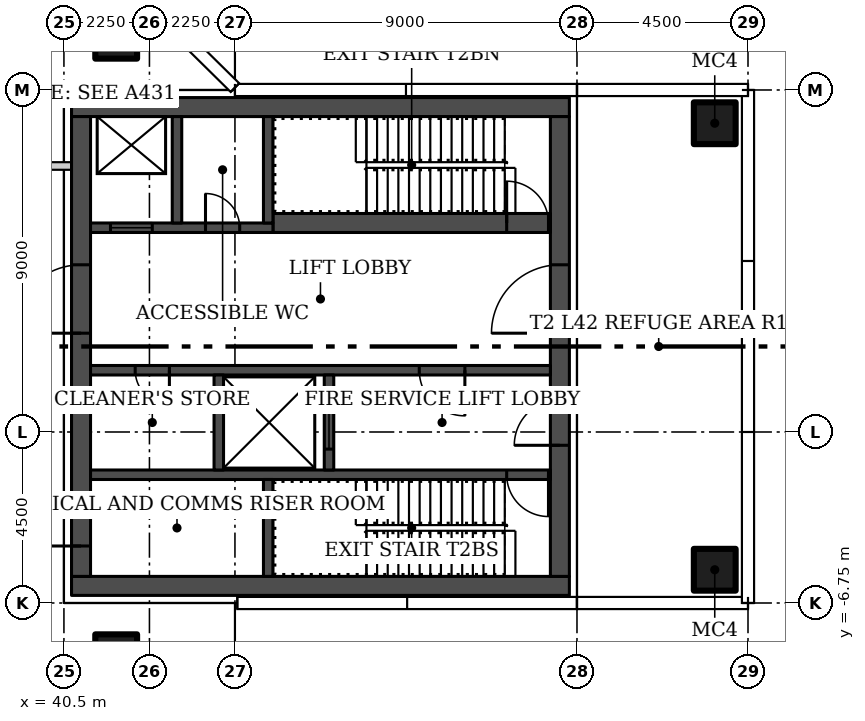
"""IFC4 building model, lengths in metres.
Left out: names, types, materials, properties, quantities, classifications, styles, units other than length and angle.
Written with IfcOpenShell. Run it as: python <this file> out.ifc"""

import sys

from ifc_helpers import new_model, si_unit, direction, frame, frame_2d, origin, origin_2d, place, context, subcontext, project, spatial, rectangle, hollow_rectangle, extrude, element, fill, save


model = new_model("IFC4")
c1 = context("Model", 3, precision=1e-05, world=origin(), true_north=direction((0.0, 1.0)))
c2 = subcontext(c1, "Body", "Model", "MODEL_VIEW")
j1 = project(units=[si_unit("LENGTHUNIT", "METRE"), si_unit("PLANEANGLEUNIT", "RADIAN")], contexts=[c1])
p1 = place(None, origin())
s1 = spatial("IfcSite", under=j1, at=p1, CompositionType="ELEMENT")
p2 = place(p1, origin())
s2 = spatial("IfcBuilding", under=s1, at=p2, CompositionType="ELEMENT")
p3 = place(p2, frame((0.0, 0.0, 177.9)))
s3 = spatial("IfcBuildingStorey", under=s2, at=p3, CompositionType="ELEMENT", Elevation=177.9)
for number, where in (
    (1, (41.875, 8.125, 0.0)),
    (2, (41.875, -8.125, 0.0)),
    (3, (57.625, -5.875, 0.0)),
    (4, (57.625, 5.875, 0.0)),
):
    element("IfcColumn", number, at=place(p3, frame(where)), inside=s3, PredefinedType="COLUMN", context=c2, shape_type="SweptSolid", body=[
        extrude(hollow_rectangle(XDim=1.1, YDim=1.1, WallThickness=0.04, at=origin_2d()), origin(), (0.0, 0.0, 1.0), 4.45),
    ])
p4 = place(p3, frame((26.8, 4.75, 0.0)))
e5 = element("IfcWall", 5, at=p4, inside=s3, PredefinedType="PARTITIONING", context=c2, shape_type="SweptSolid", body=[
    extrude(rectangle(XDim=13.9, YDim=0.2, at=frame_2d((6.95, 0.0))), origin(), (0.0, 0.0, 1.0), 4.45),
])
p5 = place(p4, frame((10.25, 0.0, 0.0)))
e6 = element("IfcOpeningElement", 6, at=p5, cuts=e5, PredefinedType="OPENING", context=c2, shape_type="SweptSolid", body=[
    extrude(rectangle(XDim=1.5, YDim=2.4, at=frame_2d((0.75, 1.2))), frame((0.0, 0.11, 0.0), z_axis=(0.0, -1.0, 0.0), x_axis=(1.0, 0.0, 0.0)), (0.0, 0.0, 1.0), 0.22),
])
p6 = place(p4, frame((2.15, 0.0, 0.0)))
e7 = element("IfcOpeningElement", 7, at=p6, cuts=e5, PredefinedType="OPENING", context=c2, shape_type="SweptSolid", body=[
    extrude(rectangle(XDim=1.5, YDim=2.4, at=frame_2d((0.75, 1.2))), frame((0.0, 0.11, 0.0), z_axis=(0.0, -1.0, 0.0), x_axis=(1.0, 0.0, 0.0)), (0.0, 0.0, 1.0), 0.22),
])
p7 = place(p3, frame((34.55, 6.75, 0.0)))
e8 = element("IfcWall", 8, at=p7, inside=s3, PredefinedType="PARTITIONING", context=c2, shape_type="SweptSolid", body=[
    extrude(rectangle(XDim=6.15, YDim=0.2, at=frame_2d((3.075, 0.0))), origin(), (0.0, 0.0, 1.0), 4.45),
])
p8 = place(p7, frame((2.275, 0.0, 0.0)))
e9 = element("IfcOpeningElement", 9, at=p8, cuts=e8, PredefinedType="OPENING", context=c2, shape_type="SweptSolid", body=[
    extrude(rectangle(XDim=1.5, YDim=2.4, at=frame_2d((0.75, 1.2))), frame((0.0, 0.11, 0.0), z_axis=(0.0, -1.0, 0.0), x_axis=(1.0, 0.0, 0.0)), (0.0, 0.0, 1.0), 0.22),
])
for number, where, z_axis, x_axis in (
    (10, (53.8, -6.3, 0.0), (0.0, 0.0, 1.0), (-1.0, 0.0, 0.0)),
    (11, (53.8, 6.3, 0.0), (0.0, 0.0, 1.0), (-1.0, 0.0, 0.0)),
):
    element("IfcWall", number, at=place(p3, frame(where, z_axis=z_axis, x_axis=x_axis)), inside=s3, PredefinedType="SHEAR", context=c2, shape_type="SweptSolid", body=[
        extrude(rectangle(XDim=13.1, YDim=0.5, at=frame_2d((6.55, 0.0))), origin(), (0.0, 0.0, 1.0), 4.45),
    ])
p9 = place(p3, frame((53.55, -6.05, 0.0), z_axis=(0.0, 0.0, 1.0), x_axis=(0.0, 1.0, 0.0)))
e12 = element("IfcWall", 12, at=p9, inside=s3, PredefinedType="SHEAR", context=c2, shape_type="SweptSolid", body=[
    extrude(rectangle(XDim=12.1, YDim=0.5, at=frame_2d((6.05, 0.0))), origin(), (0.0, 0.0, 1.0), 4.45),
])
p10 = place(p9, frame((3.45, 0.0, 0.0)))
e13 = element("IfcOpeningElement", 13, at=p10, cuts=e12, PredefinedType="OPENING", context=c2, shape_type="SweptSolid", body=[
    extrude(rectangle(XDim=1.2, YDim=2.1, at=frame_2d((0.6, 1.05))), frame((0.0, 0.26, 0.0), z_axis=(0.0, -1.0, 0.0), x_axis=(1.0, 0.0, 0.0)), (0.0, 0.0, 1.0), 0.52),
])
p11 = place(p9, frame((6.4, 0.0, 0.0)))
e14 = element("IfcOpeningElement", 14, at=p11, cuts=e12, PredefinedType="OPENING", context=c2, shape_type="SweptSolid", body=[
    extrude(rectangle(XDim=1.8, YDim=2.4, at=frame_2d((0.9, 1.2))), frame((0.0, 0.26, 0.0), z_axis=(0.0, -1.0, 0.0), x_axis=(1.0, 0.0, 0.0)), (0.0, 0.0, 1.0), 0.52),
])
p12 = place(p3, frame((40.95, -6.05, 0.0), z_axis=(0.0, 0.0, 1.0), x_axis=(0.0, 1.0, 0.0)))
e15 = element("IfcWall", 15, at=p12, inside=s3, PredefinedType="SHEAR", context=c2, shape_type="SweptSolid", body=[
    extrude(rectangle(XDim=12.1, YDim=0.5, at=frame_2d((6.05, 0.0))), origin(), (0.0, 0.0, 1.0), 4.45),
])
p13 = place(p12, frame((0.8, 0.0, 0.0)))
e16 = element("IfcOpeningElement", 16, at=p13, cuts=e15, PredefinedType="OPENING", context=c2, shape_type="SweptSolid", body=[
    extrude(rectangle(XDim=1.2, YDim=2.1, at=frame_2d((0.6, 1.05))), frame((0.0, 0.26, 0.0), z_axis=(0.0, -1.0, 0.0), x_axis=(1.0, 0.0, 0.0)), (0.0, 0.0, 1.0), 0.52),
])
p14 = place(p12, frame((6.4, 0.0, 0.0)))
e17 = element("IfcOpeningElement", 17, at=p14, cuts=e15, PredefinedType="OPENING", context=c2, shape_type="SweptSolid", body=[
    extrude(rectangle(XDim=1.8, YDim=2.4, at=frame_2d((0.9, 1.2))), frame((0.0, 0.26, 0.0), z_axis=(0.0, -1.0, 0.0), x_axis=(1.0, 0.0, 0.0)), (0.0, 0.0, 1.0), 0.52),
])
p15 = place(p3, frame((53.3, -3.375, 0.0), z_axis=(0.0, 0.0, 1.0), x_axis=(-1.0, 0.0, 0.0)))
e18 = element("IfcWall", 18, at=p15, inside=s3, PredefinedType="SHEAR", context=c2, shape_type="SweptSolid", body=[
    extrude(rectangle(XDim=12.1, YDim=0.25, at=frame_2d((6.05, 0.0))), origin(), (0.0, 0.0, 1.0), 4.45),
])
p16 = place(p15, frame((0.05, 0.0, 0.0)))
e19 = element("IfcOpeningElement", 19, at=p16, cuts=e18, PredefinedType="OPENING", context=c2, shape_type="SweptSolid", body=[
    extrude(rectangle(XDim=1.1, YDim=2.1, at=frame_2d((0.55, 1.05))), frame((0.0, 0.135, 0.0), z_axis=(0.0, -1.0, 0.0), x_axis=(1.0, 0.0, 0.0)), (0.0, 0.0, 1.0), 0.27),
])
p17 = place(p3, frame((45.875, -6.05, 0.0), z_axis=(0.0, 0.0, 1.0), x_axis=(0.0, 1.0, 0.0)))
e20 = element("IfcWall", 20, at=p17, inside=s3, PredefinedType="SHEAR", context=c2, shape_type="SweptSolid", body=[
    extrude(rectangle(XDim=2.55, YDim=0.25, at=frame_2d((1.275, 0.0))), origin(), (0.0, 0.0, 1.0), 4.45),
])
p18 = place(p3, frame((53.3, -0.625, 0.0), z_axis=(0.0, 0.0, 1.0), x_axis=(-1.0, 0.0, 0.0)))
e21 = element("IfcWall", 21, at=p18, inside=s3, PredefinedType="SHEAR", context=c2, shape_type="SweptSolid", body=[
    extrude(rectangle(XDim=12.1, YDim=0.25, at=frame_2d((6.05, 0.0))), origin(), (0.0, 0.0, 1.0), 4.45),
])
p19 = place(p18, frame((2.25, 0.0, 0.0)))
e22 = element("IfcOpeningElement", 22, at=p19, cuts=e21, PredefinedType="OPENING", context=c2, shape_type="SweptSolid", body=[
    extrude(rectangle(XDim=1.2, YDim=2.1, at=frame_2d((0.6, 1.05))), frame((0.0, 0.135, 0.0), z_axis=(0.0, -1.0, 0.0), x_axis=(1.0, 0.0, 0.0)), (0.0, 0.0, 1.0), 0.27),
])
p20 = place(p18, frame((10.025, 0.0, 0.0)))
e23 = element("IfcOpeningElement", 23, at=p20, cuts=e21, PredefinedType="OPENING", context=c2, shape_type="SweptSolid", body=[
    extrude(rectangle(XDim=0.9, YDim=2.1, at=frame_2d((0.45, 1.05))), frame((0.0, 0.135, 0.0), z_axis=(0.0, -1.0, 0.0), x_axis=(1.0, 0.0, 0.0)), (0.0, 0.0, 1.0), 0.27),
])
p21 = place(p3, frame((47.475, -3.25, 0.0), z_axis=(0.0, 0.0, 1.0), x_axis=(0.0, 1.0, 0.0)))
e24 = element("IfcWall", 24, at=p21, inside=s3, PredefinedType="SHEAR", context=c2, shape_type="SweptSolid", body=[
    extrude(rectangle(XDim=2.5, YDim=0.25, at=frame_2d((1.25, 0.0))), origin(), (0.0, 0.0, 1.0), 4.45),
])
p22 = place(p21, frame((0.55, 0.0, 0.0)))
e25 = element("IfcOpeningElement", 25, at=p22, cuts=e24, PredefinedType="OPENING", context=c2, shape_type="SweptSolid", body=[
    extrude(rectangle(XDim=1.4, YDim=2.4, at=frame_2d((0.7, 1.2))), frame((0.0, 0.135, 0.0), z_axis=(0.0, -1.0, 0.0), x_axis=(1.0, 0.0, 0.0)), (0.0, 0.0, 1.0), 0.27),
])
p23 = place(p3, frame((44.575, -3.25, 0.0), z_axis=(0.0, 0.0, 1.0), x_axis=(0.0, 1.0, 0.0)))
e26 = element("IfcWall", 26, at=p23, inside=s3, PredefinedType="SHEAR", context=c2, shape_type="SweptSolid", body=[
    extrude(rectangle(XDim=2.5, YDim=0.25, at=frame_2d((1.25, 0.0))), origin(), (0.0, 0.0, 1.0), 4.45),
])
p24 = place(p3, frame((46.0, 3.25, 0.0)))
e27 = element("IfcWall", 27, at=p24, inside=s3, PredefinedType="SHEAR", context=c2, shape_type="SweptSolid", body=[
    extrude(rectangle(XDim=7.3, YDim=0.5, at=frame_2d((3.65, 0.0))), origin(), (0.0, 0.0, 1.0), 4.45),
])
p25 = place(p24, frame((6.15, 0.0, 0.0)))
e28 = element("IfcOpeningElement", 28, at=p25, cuts=e27, PredefinedType="OPENING", context=c2, shape_type="SweptSolid", body=[
    extrude(rectangle(XDim=1.1, YDim=2.1, at=frame_2d((0.55, 1.05))), frame((0.0, 0.26, 0.0), z_axis=(0.0, -1.0, 0.0), x_axis=(1.0, 0.0, 0.0)), (0.0, 0.0, 1.0), 0.52),
])
p26 = place(p3, frame((41.2, 3.125, 0.0)))
e29 = element("IfcWall", 29, at=p26, inside=s3, PredefinedType="SHEAR", context=c2, shape_type="SweptSolid", body=[
    extrude(rectangle(XDim=4.8, YDim=0.25, at=frame_2d((2.4, 0.0))), origin(), (0.0, 0.0, 1.0), 4.45),
])
p27 = place(p26, frame((0.525, 0.0, 0.0)))
e30 = element("IfcOpeningElement", 30, at=p27, cuts=e29, PredefinedType="OPENING", context=c2, shape_type="SweptSolid", body=[
    extrude(rectangle(XDim=1.1, YDim=2.1, at=frame_2d((0.55, 1.05))), frame((0.0, 0.135, 0.0), z_axis=(0.0, -1.0, 0.0), x_axis=(1.0, 0.0, 0.0)), (0.0, 0.0, 1.0), 0.27),
])
p28 = place(p26, frame((3.025, 0.0, 0.0)))
e31 = element("IfcOpeningElement", 31, at=p28, cuts=e29, PredefinedType="OPENING", context=c2, shape_type="SweptSolid", body=[
    extrude(rectangle(XDim=0.9, YDim=2.1, at=frame_2d((0.45, 1.05))), frame((0.0, 0.135, 0.0), z_axis=(0.0, -1.0, 0.0), x_axis=(1.0, 0.0, 0.0)), (0.0, 0.0, 1.0), 0.27),
])
for number, where, z_axis, x_axis in (
    (32, (45.875, 3.25, 0.0), (0.0, 0.0, 1.0), (0.0, 1.0, 0.0)),
    (33, (43.475, 3.25, 0.0), (0.0, 0.0, 1.0), (0.0, 1.0, 0.0)),
):
    element("IfcWall", number, at=place(p3, frame(where, z_axis=z_axis, x_axis=x_axis)), inside=s3, PredefinedType="SHEAR", context=c2, shape_type="SweptSolid", body=[
        extrude(rectangle(XDim=2.8, YDim=0.25, at=frame_2d((1.4, 0.0))), origin(), (0.0, 0.0, 1.0), 4.45),
    ])
p29 = place(p10, origin())
e34 = element("IfcDoor", 34, at=p29, inside=s3, OperationType="SINGLE_SWING_LEFT", PredefinedType="DOOR", context=c2, shape_type="SweptSolid", body=[
    extrude(rectangle(XDim=1.2, YDim=2.1, at=frame_2d((0.6, 1.05))), frame((0.0, 0.025, 0.0), z_axis=(0.0, -1.0, 0.0), x_axis=(1.0, 0.0, 0.0)), (0.0, 0.0, 1.0), 0.05),
])
fill(e13, e34)
p30 = place(p11, origin())
e35 = element("IfcDoor", 35, at=p30, inside=s3, OperationType="DOUBLE_DOOR_SINGLE_SWING", PredefinedType="DOOR", context=c2, shape_type="SweptSolid", body=[
    extrude(rectangle(XDim=1.8, YDim=2.4, at=frame_2d((0.9, 1.2))), frame((0.0, 0.025, 0.0), z_axis=(0.0, -1.0, 0.0), x_axis=(1.0, 0.0, 0.0)), (0.0, 0.0, 1.0), 0.05),
])
fill(e14, e35)
p31 = place(p13, origin())
e36 = element("IfcDoor", 36, at=p31, inside=s3, OperationType="SINGLE_SWING_LEFT", PredefinedType="DOOR", context=c2, shape_type="SweptSolid", body=[
    extrude(rectangle(XDim=1.2, YDim=2.1, at=frame_2d((0.6, 1.05))), frame((0.0, 0.025, 0.0), z_axis=(0.0, -1.0, 0.0), x_axis=(1.0, 0.0, 0.0)), (0.0, 0.0, 1.0), 0.05),
])
fill(e16, e36)
p32 = place(p14, origin())
e37 = element("IfcDoor", 37, at=p32, inside=s3, OperationType="DOUBLE_DOOR_SINGLE_SWING", PredefinedType="DOOR", context=c2, shape_type="SweptSolid", body=[
    extrude(rectangle(XDim=1.8, YDim=2.4, at=frame_2d((0.9, 1.2))), frame((0.0, 0.025, 0.0), z_axis=(0.0, -1.0, 0.0), x_axis=(1.0, 0.0, 0.0)), (0.0, 0.0, 1.0), 0.05),
])
fill(e17, e37)
p33 = place(p16, origin())
e38 = element("IfcDoor", 38, at=p33, inside=s3, OperationType="SINGLE_SWING_LEFT", PredefinedType="DOOR", context=c2, shape_type="SweptSolid", body=[
    extrude(rectangle(XDim=1.1, YDim=2.1, at=frame_2d((0.55, 1.05))), frame((0.0, 0.025, 0.0), z_axis=(0.0, -1.0, 0.0), x_axis=(1.0, 0.0, 0.0)), (0.0, 0.0, 1.0), 0.05),
])
fill(e19, e38)
p34 = place(p19, origin())
e39 = element("IfcDoor", 39, at=p34, inside=s3, OperationType="SINGLE_SWING_LEFT", PredefinedType="DOOR", context=c2, shape_type="SweptSolid", body=[
    extrude(rectangle(XDim=1.2, YDim=2.1, at=frame_2d((0.6, 1.05))), frame((0.0, 0.025, 0.0), z_axis=(0.0, -1.0, 0.0), x_axis=(1.0, 0.0, 0.0)), (0.0, 0.0, 1.0), 0.05),
])
fill(e22, e39)
p35 = place(p20, origin())
e40 = element("IfcDoor", 40, at=p35, inside=s3, OperationType="SINGLE_SWING_RIGHT", PredefinedType="DOOR", context=c2, shape_type="SweptSolid", body=[
    extrude(rectangle(XDim=0.9, YDim=2.1, at=frame_2d((0.45, 1.05))), frame((0.0, 0.025, 0.0), z_axis=(0.0, -1.0, 0.0), x_axis=(1.0, 0.0, 0.0)), (0.0, 0.0, 1.0), 0.05),
])
fill(e23, e40)
p36 = place(p22, origin())
e41 = element("IfcDoor", 41, at=p36, inside=s3, OperationType="SLIDING_TO_LEFT", PredefinedType="DOOR", context=c2, shape_type="SweptSolid", body=[
    extrude(rectangle(XDim=1.4, YDim=2.4, at=frame_2d((0.7, 1.2))), frame((0.0, 0.025, 0.0), z_axis=(0.0, -1.0, 0.0), x_axis=(1.0, 0.0, 0.0)), (0.0, 0.0, 1.0), 0.05),
])
fill(e25, e41)
p37 = place(p25, origin())
e42 = element("IfcDoor", 42, at=p37, inside=s3, OperationType="SINGLE_SWING_RIGHT", PredefinedType="DOOR", context=c2, shape_type="SweptSolid", body=[
    extrude(rectangle(XDim=1.1, YDim=2.1, at=frame_2d((0.55, 1.05))), frame((0.0, 0.025, 0.0), z_axis=(0.0, -1.0, 0.0), x_axis=(1.0, 0.0, 0.0)), (0.0, 0.0, 1.0), 0.05),
])
fill(e28, e42)
p38 = place(p27, origin())
e43 = element("IfcDoor", 43, at=p38, inside=s3, OperationType="SLIDING_TO_LEFT", PredefinedType="DOOR", context=c2, shape_type="SweptSolid", body=[
    extrude(rectangle(XDim=1.1, YDim=2.1, at=frame_2d((0.55, 1.05))), frame((0.0, 0.025, 0.0), z_axis=(0.0, -1.0, 0.0), x_axis=(1.0, 0.0, 0.0)), (0.0, 0.0, 1.0), 0.05),
])
fill(e30, e43)
p39 = place(p28, origin())
e44 = element("IfcDoor", 44, at=p39, inside=s3, OperationType="SINGLE_SWING_RIGHT", PredefinedType="DOOR", context=c2, shape_type="SweptSolid", body=[
    extrude(rectangle(XDim=0.9, YDim=2.1, at=frame_2d((0.45, 1.05))), frame((0.0, 0.025, 0.0), z_axis=(0.0, -1.0, 0.0), x_axis=(1.0, 0.0, 0.0)), (0.0, 0.0, 1.0), 0.05),
])
fill(e31, e44)
save(model, sys.argv[1])
